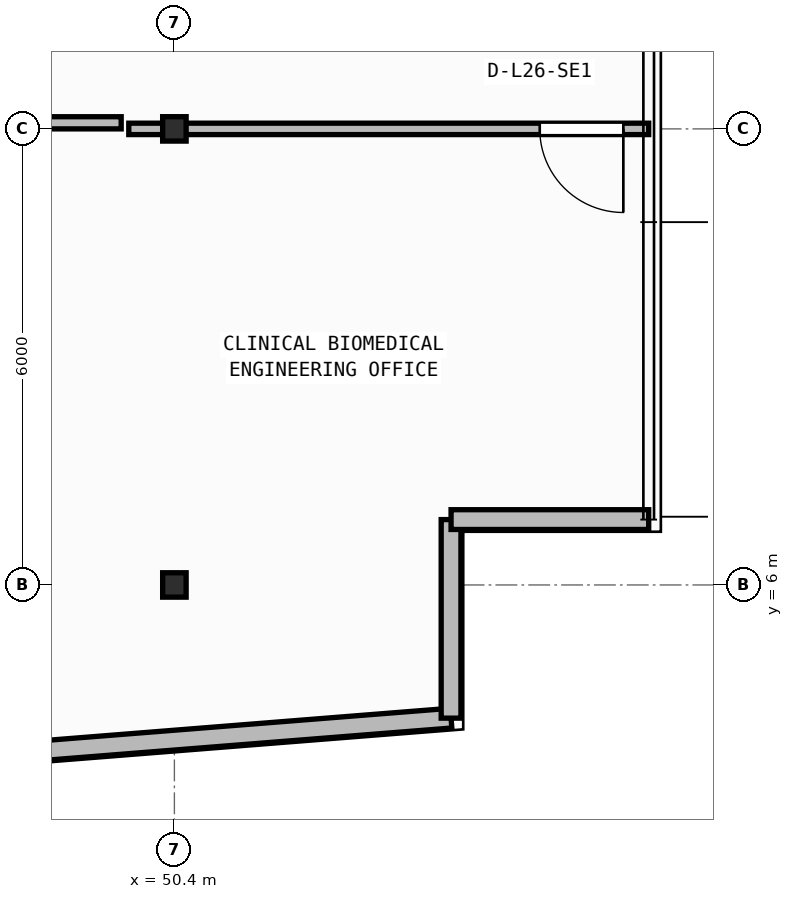
"""IFC4 building model, lengths in metres.
Left out: names, types, materials, properties, quantities, classifications, styles, units other than length and angle.
Written with IfcOpenShell. Run it as: python <this file> out.ifc"""

import sys

from ifc_helpers import new_model, si_unit, direction, frame, frame_2d, origin, origin_2d, place, context, subcontext, project, spatial, rectangle, i_section, extrude, element, fill, save


model = new_model("IFC4")
c1 = context("Model", 3, precision=1e-05, world=origin(), true_north=direction((0.0, 1.0)))
c2 = subcontext(c1, "Body", "Model", "MODEL_VIEW")
j1 = project(units=[si_unit("LENGTHUNIT", "METRE"), si_unit("PLANEANGLEUNIT", "RADIAN")], contexts=[c1])
p1 = place(None, origin())
s1 = spatial("IfcSite", under=j1, at=p1, CompositionType="ELEMENT")
p2 = place(p1, origin())
s2 = spatial("IfcBuilding", under=s1, at=p2, CompositionType="ELEMENT")
p3 = place(p2, frame((0.0, 0.0, 107.3)))
s3 = spatial("IfcBuildingStorey", under=s2, at=p3, CompositionType="ELEMENT", Elevation=107.3)
for number, where, z_axis, x_axis in (
    (1, (50.4, 6.0, 0.0), (0.0, 0.0, 1.0), (1.0, 0.0, 0.0)),
    (2, (50.4, 12.0, 0.0), (0.0, 0.0, 1.0), (1.0, 0.0, 0.0)),
):
    element("IfcColumn", number, at=place(p3, frame(where, z_axis=z_axis, x_axis=x_axis)), inside=s3, PredefinedType="COLUMN", context=c2, shape_type="SweptSolid", body=[
        extrude(i_section(OverallWidth=0.309, OverallDepth=0.321, WebThickness=0.014, FlangeThickness=0.022, FilletRadius=0.017, at=origin_2d()), origin(), (0.0, 0.0, 1.0), 3.95),
    ])
p4 = place(p3, frame((2.76, 0.173, 0.0), z_axis=(0.0, 0.0, 1.0), x_axis=(0.996857931723, 0.079210251617, 0.0)))
e3 = element("IfcWall", 3, at=p4, inside=s3, PredefinedType="STANDARD", context=c2, shape_type="SweptSolid", body=[
    extrude(rectangle(XDim=51.442, YDim=0.26, at=frame_2d((25.721, 0.0))), origin(), (0.0, 0.0, 1.0), 3.71),
])
p5 = place(p4, frame((24.521, 0.0, 0.9)))
e4 = element("IfcOpeningElement", 4, at=p5, cuts=e3, PredefinedType="OPENING", context=c2, shape_type="SweptSolid", body=[
    extrude(rectangle(XDim=2.4, YDim=1.65, at=frame_2d((1.2, 0.825))), frame((0.0, 0.14, 0.0), z_axis=(0.0, -1.0, 0.0), x_axis=(1.0, 0.0, 0.0)), (0.0, 0.0, 1.0), 0.28),
])
p6 = place(p3, frame((54.04, 4.248, 0.0), z_axis=(0.0, 0.0, 1.0), x_axis=(0.0, 1.0, 0.0)))
e5 = element("IfcWall", 5, at=p6, inside=s3, PredefinedType="STANDARD", context=c2, shape_type="SweptSolid", body=[
    extrude(rectangle(XDim=2.612, YDim=0.26, at=frame_2d((1.306, 0.0))), origin(), (0.0, 0.0, 1.0), 3.71),
])
p7 = place(p3, frame((54.04, 6.86, 0.0), z_axis=(0.0, 0.0, 1.0), x_axis=(1.0, 0.0, 0.0)))
e6 = element("IfcWall", 6, at=p7, inside=s3, PredefinedType="STANDARD", context=c2, shape_type="SweptSolid", body=[
    extrude(rectangle(XDim=2.6, YDim=0.26, at=frame_2d((1.3, 0.0))), origin(), (0.0, 0.0, 1.0), 3.71),
])
p8 = place(p3, frame((56.64, 12.0, 0.0), z_axis=(0.0, 0.0, 1.0), x_axis=(-1.0, 0.0, 0.0)))
e7 = element("IfcWall", 7, at=p8, inside=s3, PredefinedType="PARTITIONING", context=c2, shape_type="SweptSolid", body=[
    extrude(rectangle(XDim=6.84, YDim=0.15, at=frame_2d((3.42, 0.0))), origin(), (0.0, 0.0, 1.0), 3.083),
])
p9 = place(p8, frame((0.333, 0.0, 0.0)))
e8 = element("IfcOpeningElement", 8, at=p9, cuts=e7, PredefinedType="OPENING", context=c2, shape_type="SweptSolid", body=[
    extrude(rectangle(XDim=1.1, YDim=2.1, at=frame_2d((0.55, 1.05))), frame((0.0, 0.085, 0.0), z_axis=(0.0, -1.0, 0.0), x_axis=(1.0, 0.0, 0.0)), (0.0, 0.0, 1.0), 0.17),
])
p10 = place(p3, frame((46.689, 12.08, 0.0), z_axis=(0.0, 0.0, 1.0), x_axis=(1.0, 0.0, 0.0)))
e9 = element("IfcWall", 9, at=p10, inside=s3, PredefinedType="PARTITIONING", context=c2, shape_type="SweptSolid", body=[
    extrude(rectangle(XDim=3.011, YDim=0.16, at=frame_2d((1.505, 0.0))), origin(), (0.0, 0.0, 1.0), 3.083),
])
p11 = place(p9, origin())
e10 = element("IfcDoor", 10, at=p11, inside=s3, OperationType="SINGLE_SWING_LEFT", PredefinedType="DOOR", context=c2, shape_type="SweptSolid", body=[
    extrude(rectangle(XDim=1.1, YDim=2.1, at=frame_2d((0.55, 1.05))), frame((0.0, 0.025, 0.0), z_axis=(0.0, -1.0, 0.0), x_axis=(1.0, 0.0, 0.0)), (0.0, 0.0, 1.0), 0.05),
])
fill(e8, e10)
save(model, sys.argv[1])
